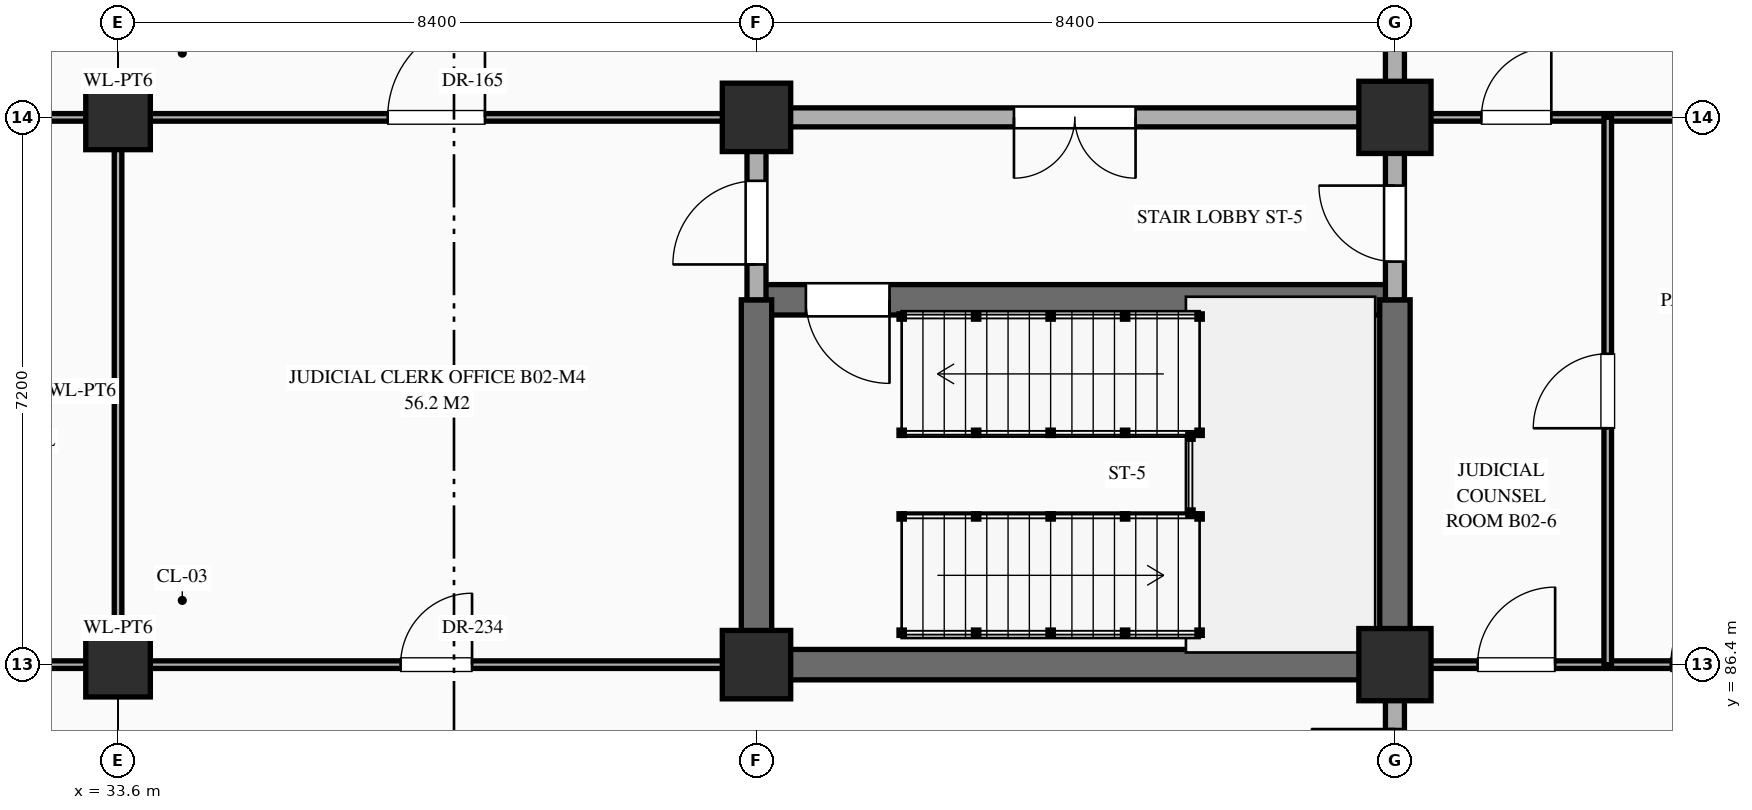
"""IFC4 building model, lengths in metres.
Left out: names, types, materials, properties, quantities, classifications, styles, units other than length and angle.
Written with IfcOpenShell. Run it as: python <this file> out.ifc"""

import sys

from ifc_helpers import new_model, si_unit, direction, frame, frame_2d, origin, origin_2d, place, context, subcontext, project, spatial, rectangle, extrude, element, fill, save


model = new_model("IFC4")
c1 = context("Model", 3, precision=1e-05, world=origin(), true_north=direction((0.0, 1.0)))
c2 = subcontext(c1, "Body", "Model", "MODEL_VIEW")
j1 = project(units=[si_unit("LENGTHUNIT", "METRE"), si_unit("PLANEANGLEUNIT", "RADIAN")], contexts=[c1])
p1 = place(None, origin())
s1 = spatial("IfcSite", under=j1, at=p1, CompositionType="ELEMENT")
p2 = place(p1, origin())
s2 = spatial("IfcBuilding", under=s1, at=p2, CompositionType="ELEMENT")
p3 = place(p2, frame((0.0, 0.0, -10.2)))
s3 = spatial("IfcBuildingStorey", under=s2, at=p3, CompositionType="ELEMENT", Elevation=-10.2)
for number, where, z_axis, x_axis in (
    (1, (33.6, 86.4, 0.0), (0.0, 0.0, 1.0), (1.0, 0.0, 0.0)),
    (2, (33.6, 93.6, 0.0), (0.0, 0.0, 1.0), (1.0, 0.0, 0.0)),
):
    element("IfcColumn", number, at=place(p3, frame(where, z_axis=z_axis, x_axis=x_axis)), inside=s3, PredefinedType="COLUMN", context=c2, shape_type="SweptSolid", body=[
        extrude(rectangle(XDim=0.85, YDim=0.85, at=origin_2d()), origin(), (0.0, 0.0, 1.0), 4.8),
    ])
for number, where, z_axis, x_axis in (
    (3, (42.0, 86.4, 0.0), (0.0, 0.0, 1.0), (1.0, 0.0, 0.0)),
    (4, (42.0, 93.6, 0.0), (0.0, 0.0, 1.0), (1.0, 0.0, 0.0)),
):
    element("IfcColumn", number, at=place(p3, frame(where, z_axis=z_axis, x_axis=x_axis)), inside=s3, PredefinedType="COLUMN", context=c2, shape_type="SweptSolid", body=[
        extrude(rectangle(XDim=0.9, YDim=0.9, at=origin_2d()), origin(), (0.0, 0.0, 1.0), 4.8),
    ])
for number, where, z_axis, x_axis in (
    (5, (50.4, 86.4, 0.0), (0.0, 0.0, 1.0), (1.0, 0.0, 0.0)),
    (6, (50.4, 93.6, 0.0), (0.0, 0.0, 1.0), (1.0, 0.0, 0.0)),
):
    element("IfcColumn", number, at=place(p3, frame(where, z_axis=z_axis, x_axis=x_axis)), inside=s3, PredefinedType="COLUMN", context=c2, shape_type="SweptSolid", body=[
        extrude(rectangle(XDim=0.95, YDim=0.95, at=origin_2d()), origin(), (0.0, 0.0, 1.0), 4.8),
    ])
p4 = place(p3, frame((25.2, 86.4, 0.0), z_axis=(0.0, 0.0, 1.0), x_axis=(1.0, 0.0, 0.0)))
e7 = element("IfcWall", 7, at=p4, inside=s3, PredefinedType="STANDARD", context=c2, shape_type="SweptSolid", body=[
    extrude(rectangle(XDim=16.8, YDim=0.1, at=frame_2d((8.4, 0.0))), origin(), (0.0, 0.0, 1.0), 3.63),
])
p5 = place(p4, frame((1.005, 0.0, 0.0)))
e8 = element("IfcOpeningElement", 8, at=p5, cuts=e7, PredefinedType="OPENING", context=c2, shape_type="SweptSolid", body=[
    extrude(rectangle(XDim=1.16, YDim=2.3, at=frame_2d((0.58, 1.15))), frame((0.0, 0.062, 0.0), z_axis=(0.0, -1.0, 0.0), x_axis=(1.0, 0.0, 0.0)), (0.0, 0.0, 1.0), 0.124),
])
p6 = place(p4, frame((3.35, 0.0, 0.0)))
e9 = element("IfcOpeningElement", 9, at=p6, cuts=e7, PredefinedType="OPENING", context=c2, shape_type="SweptSolid", body=[
    extrude(rectangle(XDim=1.7, YDim=2.45, at=frame_2d((0.85, 1.225))), frame((0.0, 0.062, 0.0), z_axis=(0.0, -1.0, 0.0), x_axis=(1.0, 0.0, 0.0)), (0.0, 0.0, 1.0), 0.124),
])
p7 = place(p4, frame((6.188, 0.0, 0.0)))
e10 = element("IfcOpeningElement", 10, at=p7, cuts=e7, PredefinedType="OPENING", context=c2, shape_type="SweptSolid", body=[
    extrude(rectangle(XDim=1.28, YDim=2.35, at=frame_2d((0.64, 1.175))), frame((0.0, 0.062, 0.0), z_axis=(0.0, -1.0, 0.0), x_axis=(1.0, 0.0, 0.0)), (0.0, 0.0, 1.0), 0.124),
])
p8 = place(p4, frame((12.117, 0.0, 0.0)))
e11 = element("IfcOpeningElement", 11, at=p8, cuts=e7, PredefinedType="OPENING", context=c2, shape_type="SweptSolid", body=[
    extrude(rectangle(XDim=0.94, YDim=2.3, at=frame_2d((0.47, 1.15))), frame((0.0, 0.062, 0.0), z_axis=(0.0, -1.0, 0.0), x_axis=(1.0, 0.0, 0.0)), (0.0, 0.0, 1.0), 0.124),
])
p9 = place(p3, frame((42.0, 86.4, 0.0), z_axis=(0.0, 0.0, 1.0), x_axis=(1.0, 0.0, 0.0)))
e12 = element("IfcWall", 12, at=p9, inside=s3, PredefinedType="SHEAR", context=c2, shape_type="SweptSolid", body=[
    extrude(rectangle(XDim=8.4, YDim=0.4, at=frame_2d((4.2, 0.0))), origin(), (0.0, 0.0, 1.0), 4.48),
])
p10 = place(p3, frame((50.4, 86.4, 0.0), z_axis=(0.0, 0.0, 1.0), x_axis=(1.0, 0.0, 0.0)))
e13 = element("IfcWall", 13, at=p10, inside=s3, PredefinedType="STANDARD", context=c2, shape_type="SweptSolid", body=[
    extrude(rectangle(XDim=8.4, YDim=0.1, at=frame_2d((4.2, 0.0))), origin(), (0.0, 0.0, 1.0), 3.63),
])
p11 = place(p10, frame((1.087, 0.0, 0.0)))
e14 = element("IfcOpeningElement", 14, at=p11, cuts=e13, PredefinedType="OPENING", context=c2, shape_type="SweptSolid", body=[
    extrude(rectangle(XDim=1.02, YDim=2.4, at=frame_2d((0.51, 1.2))), frame((0.0, 0.062, 0.0), z_axis=(0.0, -1.0, 0.0), x_axis=(1.0, 0.0, 0.0)), (0.0, 0.0, 1.0), 0.124),
])
p12 = place(p10, frame((3.63, 0.0, 0.0)))
e15 = element("IfcOpeningElement", 15, at=p12, cuts=e13, PredefinedType="OPENING", context=c2, shape_type="SweptSolid", body=[
    extrude(rectangle(XDim=1.14, YDim=2.4, at=frame_2d((0.57, 1.2))), frame((0.0, 0.062, 0.0), z_axis=(0.0, -1.0, 0.0), x_axis=(1.0, 0.0, 0.0)), (0.0, 0.0, 1.0), 0.124),
])
p13 = place(p10, frame((6.353, 0.0, 0.0)))
e16 = element("IfcOpeningElement", 16, at=p13, cuts=e13, PredefinedType="OPENING", context=c2, shape_type="SweptSolid", body=[
    extrude(rectangle(XDim=0.9, YDim=2.15, at=frame_2d((0.45, 1.075))), frame((0.0, 0.062, 0.0), z_axis=(0.0, -1.0, 0.0), x_axis=(1.0, 0.0, 0.0)), (0.0, 0.0, 1.0), 0.124),
])
p14 = place(p3, frame((42.0, 91.2, 0.0), z_axis=(0.0, 0.0, 1.0), x_axis=(1.0, 0.0, 0.0)))
e17 = element("IfcWall", 17, at=p14, inside=s3, PredefinedType="SHEAR", context=c2, shape_type="SweptSolid", body=[
    extrude(rectangle(XDim=8.4, YDim=0.4, at=frame_2d((4.2, 0.0))), origin(), (0.0, 0.0, 1.0), 4.48),
])
p15 = place(p14, frame((0.65, 0.0, 0.0)))
e18 = element("IfcOpeningElement", 18, at=p15, cuts=e17, PredefinedType="OPENING", context=c2, shape_type="SweptSolid", body=[
    extrude(rectangle(XDim=1.1, YDim=2.2, at=frame_2d((0.55, 1.1))), frame((0.0, 0.212, 0.0), z_axis=(0.0, -1.0, 0.0), x_axis=(1.0, 0.0, 0.0)), (0.0, 0.0, 1.0), 0.424),
])
p16 = place(p3, frame((25.2, 93.6, 0.0), z_axis=(0.0, 0.0, 1.0), x_axis=(1.0, 0.0, 0.0)))
e19 = element("IfcWall", 19, at=p16, inside=s3, PredefinedType="STANDARD", context=c2, shape_type="SweptSolid", body=[
    extrude(rectangle(XDim=16.8, YDim=0.1, at=frame_2d((8.4, 0.0))), origin(), (0.0, 0.0, 1.0), 3.63),
])
p17 = place(p16, frame((1.005, 0.0, 0.0)))
e20 = element("IfcOpeningElement", 20, at=p17, cuts=e19, PredefinedType="OPENING", context=c2, shape_type="SweptSolid", body=[
    extrude(rectangle(XDim=1.16, YDim=2.3, at=frame_2d((0.58, 1.15))), frame((0.0, 0.062, 0.0), z_axis=(0.0, -1.0, 0.0), x_axis=(1.0, 0.0, 0.0)), (0.0, 0.0, 1.0), 0.124),
])
p18 = place(p16, frame((3.3, 0.0, 0.0)))
e21 = element("IfcOpeningElement", 21, at=p18, cuts=e19, PredefinedType="OPENING", context=c2, shape_type="SweptSolid", body=[
    extrude(rectangle(XDim=1.8, YDim=2.5, at=frame_2d((0.9, 1.25))), frame((0.0, 0.062, 0.0), z_axis=(0.0, -1.0, 0.0), x_axis=(1.0, 0.0, 0.0)), (0.0, 0.0, 1.0), 0.124),
])
p19 = place(p16, frame((6.208, 0.0, 0.0)))
e22 = element("IfcOpeningElement", 22, at=p19, cuts=e19, PredefinedType="OPENING", context=c2, shape_type="SweptSolid", body=[
    extrude(rectangle(XDim=1.24, YDim=2.3, at=frame_2d((0.62, 1.15))), frame((0.0, 0.062, 0.0), z_axis=(0.0, -1.0, 0.0), x_axis=(1.0, 0.0, 0.0)), (0.0, 0.0, 1.0), 0.124),
])
p20 = place(p16, frame((11.948, 0.0, 0.0)))
e23 = element("IfcOpeningElement", 23, at=p20, cuts=e19, PredefinedType="OPENING", context=c2, shape_type="SweptSolid", body=[
    extrude(rectangle(XDim=1.28, YDim=2.35, at=frame_2d((0.64, 1.175))), frame((0.0, 0.062, 0.0), z_axis=(0.0, -1.0, 0.0), x_axis=(1.0, 0.0, 0.0)), (0.0, 0.0, 1.0), 0.124),
])
p21 = place(p3, frame((42.0, 93.6, 0.0), z_axis=(0.0, 0.0, 1.0), x_axis=(1.0, 0.0, 0.0)))
e24 = element("IfcWall", 24, at=p21, inside=s3, PredefinedType="STANDARD", context=c2, shape_type="SweptSolid", body=[
    extrude(rectangle(XDim=8.4, YDim=0.25, at=frame_2d((4.2, 0.0))), origin(), (0.0, 0.0, 1.0), 3.63),
])
p22 = place(p21, frame((3.387, 0.0, 0.0)))
e25 = element("IfcOpeningElement", 25, at=p22, cuts=e24, PredefinedType="OPENING", context=c2, shape_type="SweptSolid", body=[
    extrude(rectangle(XDim=1.6, YDim=2.3, at=frame_2d((0.8, 1.15))), frame((0.0, 0.137, 0.0), z_axis=(0.0, -1.0, 0.0), x_axis=(1.0, 0.0, 0.0)), (0.0, 0.0, 1.0), 0.274),
])
p23 = place(p3, frame((50.4, 93.6, 0.0), z_axis=(0.0, 0.0, 1.0), x_axis=(1.0, 0.0, 0.0)))
e26 = element("IfcWall", 26, at=p23, inside=s3, PredefinedType="STANDARD", context=c2, shape_type="SweptSolid", body=[
    extrude(rectangle(XDim=8.4, YDim=0.1, at=frame_2d((4.2, 0.0))), origin(), (0.0, 0.0, 1.0), 3.63),
])
p24 = place(p23, frame((1.137, 0.0, 0.0)))
e27 = element("IfcOpeningElement", 27, at=p24, cuts=e26, PredefinedType="OPENING", context=c2, shape_type="SweptSolid", body=[
    extrude(rectangle(XDim=0.92, YDim=2.15, at=frame_2d((0.46, 1.075))), frame((0.0, 0.062, 0.0), z_axis=(0.0, -1.0, 0.0), x_axis=(1.0, 0.0, 0.0)), (0.0, 0.0, 1.0), 0.124),
])
p25 = place(p23, frame((3.72, 0.0, 0.0)))
e28 = element("IfcOpeningElement", 28, at=p25, cuts=e26, PredefinedType="OPENING", context=c2, shape_type="SweptSolid", body=[
    extrude(rectangle(XDim=0.96, YDim=2.2, at=frame_2d((0.48, 1.1))), frame((0.0, 0.062, 0.0), z_axis=(0.0, -1.0, 0.0), x_axis=(1.0, 0.0, 0.0)), (0.0, 0.0, 1.0), 0.124),
])
p26 = place(p23, frame((6.302, 0.0, 0.0)))
e29 = element("IfcOpeningElement", 29, at=p26, cuts=e26, PredefinedType="OPENING", context=c2, shape_type="SweptSolid", body=[
    extrude(rectangle(XDim=1.0, YDim=2.25, at=frame_2d((0.5, 1.125))), frame((0.0, 0.062, 0.0), z_axis=(0.0, -1.0, 0.0), x_axis=(1.0, 0.0, 0.0)), (0.0, 0.0, 1.0), 0.124),
])
p27 = place(p3, frame((33.6, 86.4, 0.0), z_axis=(0.0, 0.0, 1.0), x_axis=(0.0, 1.0, 0.0)))
e30 = element("IfcWall", 30, at=p27, inside=s3, PredefinedType="STANDARD", context=c2, shape_type="SweptSolid", body=[
    extrude(rectangle(XDim=7.2, YDim=0.1, at=frame_2d((3.6, 0.0))), origin(), (0.0, 0.0, 1.0), 3.73),
])
p28 = place(p3, frame((42.0, 86.4, 0.0), z_axis=(0.0, 0.0, 1.0), x_axis=(0.0, 1.0, 0.0)))
e31 = element("IfcWall", 31, at=p28, inside=s3, PredefinedType="SHEAR", context=c2, shape_type="SweptSolid", body=[
    extrude(rectangle(XDim=4.8, YDim=0.4, at=frame_2d((2.4, 0.0))), origin(), (0.0, 0.0, 1.0), 4.48),
])
p29 = place(p3, frame((42.0, 91.2, 0.0), z_axis=(0.0, 0.0, 1.0), x_axis=(0.0, 1.0, 0.0)))
e32 = element("IfcWall", 32, at=p29, inside=s3, PredefinedType="STANDARD", context=c2, shape_type="SweptSolid", body=[
    extrude(rectangle(XDim=2.4, YDim=0.25, at=frame_2d((1.2, 0.0))), origin(), (0.0, 0.0, 1.0), 3.73),
])
p30 = place(p29, frame((0.465, 0.0, 0.0)))
e33 = element("IfcOpeningElement", 33, at=p30, cuts=e32, PredefinedType="OPENING", context=c2, shape_type="SweptSolid", body=[
    extrude(rectangle(XDim=1.1, YDim=2.2, at=frame_2d((0.55, 1.1))), frame((0.0, 0.137, 0.0), z_axis=(0.0, -1.0, 0.0), x_axis=(1.0, 0.0, 0.0)), (0.0, 0.0, 1.0), 0.274),
])
p31 = place(p3, frame((50.4, 43.2, 0.0), z_axis=(0.0, 0.0, 1.0), x_axis=(0.0, 1.0, 0.0)))
e34 = element("IfcWall", 34, at=p31, inside=s3, PredefinedType="STANDARD", context=c2, shape_type="SweptSolid", body=[
    extrude(rectangle(XDim=43.2, YDim=0.25, at=frame_2d((21.6, 0.0))), origin(), (0.0, 0.0, 1.0), 3.73),
])
p32 = place(p31, frame((41.252, 0.0, 0.0)))
e35 = element("IfcOpeningElement", 35, at=p32, cuts=e34, PredefinedType="OPENING", context=c2, shape_type="SweptSolid", body=[
    extrude(rectangle(XDim=1.1, YDim=2.2, at=frame_2d((0.55, 1.1))), frame((0.0, 0.137, 0.0), z_axis=(0.0, -1.0, 0.0), x_axis=(1.0, 0.0, 0.0)), (0.0, 0.0, 1.0), 0.274),
])
p33 = place(p3, frame((50.4, 86.4, 0.0), z_axis=(0.0, 0.0, 1.0), x_axis=(0.0, 1.0, 0.0)))
e36 = element("IfcWall", 36, at=p33, inside=s3, PredefinedType="SHEAR", context=c2, shape_type="SweptSolid", body=[
    extrude(rectangle(XDim=4.8, YDim=0.4, at=frame_2d((2.4, 0.0))), origin(), (0.0, 0.0, 1.0), 4.48),
])
p34 = place(p3, frame((50.4, 91.2, 0.0), z_axis=(0.0, 0.0, 1.0), x_axis=(0.0, 1.0, 0.0)))
e37 = element("IfcWall", 37, at=p34, inside=s3, PredefinedType="STANDARD", context=c2, shape_type="SweptSolid", body=[
    extrude(rectangle(XDim=23.96, YDim=0.25, at=frame_2d((11.98, 0.0))), origin(), (0.0, 0.0, 1.0), 3.73),
])
p35 = place(p34, frame((0.502, 0.0, 0.0)))
e38 = element("IfcOpeningElement", 38, at=p35, cuts=e37, PredefinedType="OPENING", context=c2, shape_type="SweptSolid", body=[
    extrude(rectangle(XDim=1.0, YDim=2.2, at=frame_2d((0.5, 1.1))), frame((0.0, 0.137, 0.0), z_axis=(0.0, -1.0, 0.0), x_axis=(1.0, 0.0, 0.0)), (0.0, 0.0, 1.0), 0.274),
])
p36 = place(p34, frame((10.522, 0.0, 0.0)))
e39 = element("IfcOpeningElement", 39, at=p36, cuts=e37, PredefinedType="OPENING", context=c2, shape_type="SweptSolid", body=[
    extrude(rectangle(XDim=0.95, YDim=2.15, at=frame_2d((0.475, 1.075))), frame((0.0, 0.137, 0.0), z_axis=(0.0, -1.0, 0.0), x_axis=(1.0, 0.0, 0.0)), (0.0, 0.0, 1.0), 0.274),
])
p37 = place(p34, frame((3.323, 0.0, 0.0)))
e40 = element("IfcOpeningElement", 40, at=p37, cuts=e37, PredefinedType="OPENING", context=c2, shape_type="SweptSolid", body=[
    extrude(rectangle(XDim=0.95, YDim=2.15, at=frame_2d((0.475, 1.075))), frame((0.0, 0.137, 0.0), z_axis=(0.0, -1.0, 0.0), x_axis=(1.0, 0.0, 0.0)), (0.0, 0.0, 1.0), 0.274),
])
p38 = place(p34, frame((17.698, 0.0, 0.0)))
e41 = element("IfcOpeningElement", 41, at=p38, cuts=e37, PredefinedType="OPENING", context=c2, shape_type="SweptSolid", body=[
    extrude(rectangle(XDim=1.0, YDim=2.2, at=frame_2d((0.5, 1.1))), frame((0.0, 0.137, 0.0), z_axis=(0.0, -1.0, 0.0), x_axis=(1.0, 0.0, 0.0)), (0.0, 0.0, 1.0), 0.274),
])
p39 = place(p3, frame((53.2, 86.4, 0.0), z_axis=(0.0, 0.0, 1.0), x_axis=(0.0, 1.0, 0.0)))
e42 = element("IfcWall", 42, at=p39, inside=s3, PredefinedType="STANDARD", context=c2, shape_type="SweptSolid", body=[
    extrude(rectangle(XDim=7.2, YDim=0.1, at=frame_2d((3.6, 0.0))), origin(), (0.0, 0.0, 1.0), 4.48),
])
p40 = place(p39, frame((3.11, 0.0, 0.0)))
e43 = element("IfcOpeningElement", 43, at=p40, cuts=e42, PredefinedType="OPENING", context=c2, shape_type="SweptSolid", body=[
    extrude(rectangle(XDim=0.98, YDim=2.35, at=frame_2d((0.49, 1.175))), frame((0.0, 0.062, 0.0), z_axis=(0.0, -1.0, 0.0), x_axis=(1.0, 0.0, 0.0)), (0.0, 0.0, 1.0), 0.124),
])
p41 = place(p15, frame((1.1, 0.0, 0.0), z_axis=(0.0, 0.0, 1.0), x_axis=(-1.0, 0.0, 0.0)))
e44 = element("IfcDoor", 44, at=p41, inside=s3, OperationType="SINGLE_SWING_LEFT", PredefinedType="DOOR", context=c2, shape_type="SweptSolid", body=[
    extrude(rectangle(XDim=1.1, YDim=2.2, at=frame_2d((0.55, 1.1))), frame((0.0, 0.025, 0.0), z_axis=(0.0, -1.0, 0.0), x_axis=(1.0, 0.0, 0.0)), (0.0, 0.0, 1.0), 0.05),
])
fill(e18, e44)
p42 = place(p22, frame((1.6, 0.0, 0.0), z_axis=(0.0, 0.0, 1.0), x_axis=(-1.0, 0.0, 0.0)))
e45 = element("IfcDoor", 45, at=p42, inside=s3, OperationType="DOUBLE_DOOR_SINGLE_SWING", PredefinedType="DOOR", context=c2, shape_type="SweptSolid", body=[
    extrude(rectangle(XDim=1.6, YDim=2.3, at=frame_2d((0.8, 1.15))), frame((0.0, 0.025, 0.0), z_axis=(0.0, -1.0, 0.0), x_axis=(1.0, 0.0, 0.0)), (0.0, 0.0, 1.0), 0.05),
])
fill(e25, e45)
p43 = place(p30, origin())
e46 = element("IfcDoor", 46, at=p43, inside=s3, OperationType="SINGLE_SWING_LEFT", PredefinedType="DOOR", context=c2, shape_type="SweptSolid", body=[
    extrude(rectangle(XDim=1.1, YDim=2.2, at=frame_2d((0.55, 1.1))), frame((0.0, 0.025, 0.0), z_axis=(0.0, -1.0, 0.0), x_axis=(1.0, 0.0, 0.0)), (0.0, 0.0, 1.0), 0.05),
])
fill(e33, e46)
p44 = place(p35, origin())
e47 = element("IfcDoor", 47, at=p44, inside=s3, OperationType="SINGLE_SWING_RIGHT", PredefinedType="DOOR", context=c2, shape_type="SweptSolid", body=[
    extrude(rectangle(XDim=1.0, YDim=2.2, at=frame_2d((0.5, 1.1))), frame((0.0, 0.025, 0.0), z_axis=(0.0, -1.0, 0.0), x_axis=(1.0, 0.0, 0.0)), (0.0, 0.0, 1.0), 0.05),
])
fill(e38, e47)
p45 = place(p20, origin())
e48 = element("IfcDoor", 48, at=p45, inside=s3, OperationType="SINGLE_SWING_RIGHT", PredefinedType="DOOR", context=c2, shape_type="SweptSolid", body=[
    extrude(rectangle(XDim=1.28, YDim=2.35, at=frame_2d((0.64, 1.175))), frame((0.0, 0.025, 0.0), z_axis=(0.0, -1.0, 0.0), x_axis=(1.0, 0.0, 0.0)), (0.0, 0.0, 1.0), 0.05),
])
fill(e23, e48)
p46 = place(p24, origin())
e49 = element("IfcDoor", 49, at=p46, inside=s3, OperationType="SINGLE_SWING_RIGHT", PredefinedType="DOOR", context=c2, shape_type="SweptSolid", body=[
    extrude(rectangle(XDim=0.92, YDim=2.15, at=frame_2d((0.46, 1.075))), frame((0.0, 0.025, 0.0), z_axis=(0.0, -1.0, 0.0), x_axis=(1.0, 0.0, 0.0)), (0.0, 0.0, 1.0), 0.05),
])
fill(e27, e49)
p47 = place(p8, origin())
e50 = element("IfcDoor", 50, at=p47, inside=s3, OperationType="SINGLE_SWING_RIGHT", PredefinedType="DOOR", context=c2, shape_type="SweptSolid", body=[
    extrude(rectangle(XDim=0.94, YDim=2.3, at=frame_2d((0.47, 1.15))), frame((0.0, 0.025, 0.0), z_axis=(0.0, -1.0, 0.0), x_axis=(1.0, 0.0, 0.0)), (0.0, 0.0, 1.0), 0.05),
])
fill(e11, e50)
p48 = place(p40, origin())
e51 = element("IfcDoor", 51, at=p48, inside=s3, OperationType="SINGLE_SWING_LEFT", PredefinedType="DOOR", context=c2, shape_type="SweptSolid", body=[
    extrude(rectangle(XDim=0.98, YDim=2.35, at=frame_2d((0.49, 1.175))), frame((0.0, 0.025, 0.0), z_axis=(0.0, -1.0, 0.0), x_axis=(1.0, 0.0, 0.0)), (0.0, 0.0, 1.0), 0.05),
])
fill(e43, e51)
p49 = place(p11, origin())
e52 = element("IfcDoor", 52, at=p49, inside=s3, OperationType="SINGLE_SWING_RIGHT", PredefinedType="DOOR", context=c2, shape_type="SweptSolid", body=[
    extrude(rectangle(XDim=1.02, YDim=2.4, at=frame_2d((0.51, 1.2))), frame((0.0, 0.025, 0.0), z_axis=(0.0, -1.0, 0.0), x_axis=(1.0, 0.0, 0.0)), (0.0, 0.0, 1.0), 0.05),
])
fill(e14, e52)
p50 = place(p12, origin())
e53 = element("IfcDoor", 53, at=p50, inside=s3, OperationType="SINGLE_SWING_RIGHT", PredefinedType="DOOR", context=c2, shape_type="SweptSolid", body=[
    extrude(rectangle(XDim=1.14, YDim=2.4, at=frame_2d((0.57, 1.2))), frame((0.0, 0.025, 0.0), z_axis=(0.0, -1.0, 0.0), x_axis=(1.0, 0.0, 0.0)), (0.0, 0.0, 1.0), 0.05),
])
fill(e15, e53)
p51 = place(p32, origin())
e54 = element("IfcDoor", 54, at=p51, inside=s3, OperationType="SINGLE_SWING_RIGHT", PredefinedType="DOOR", context=c2, shape_type="SweptSolid", body=[
    extrude(rectangle(XDim=1.1, YDim=2.2, at=frame_2d((0.55, 1.1))), frame((0.0, 0.025, 0.0), z_axis=(0.0, -1.0, 0.0), x_axis=(1.0, 0.0, 0.0)), (0.0, 0.0, 1.0), 0.05),
])
fill(e35, e54)
save(model, sys.argv[1])
